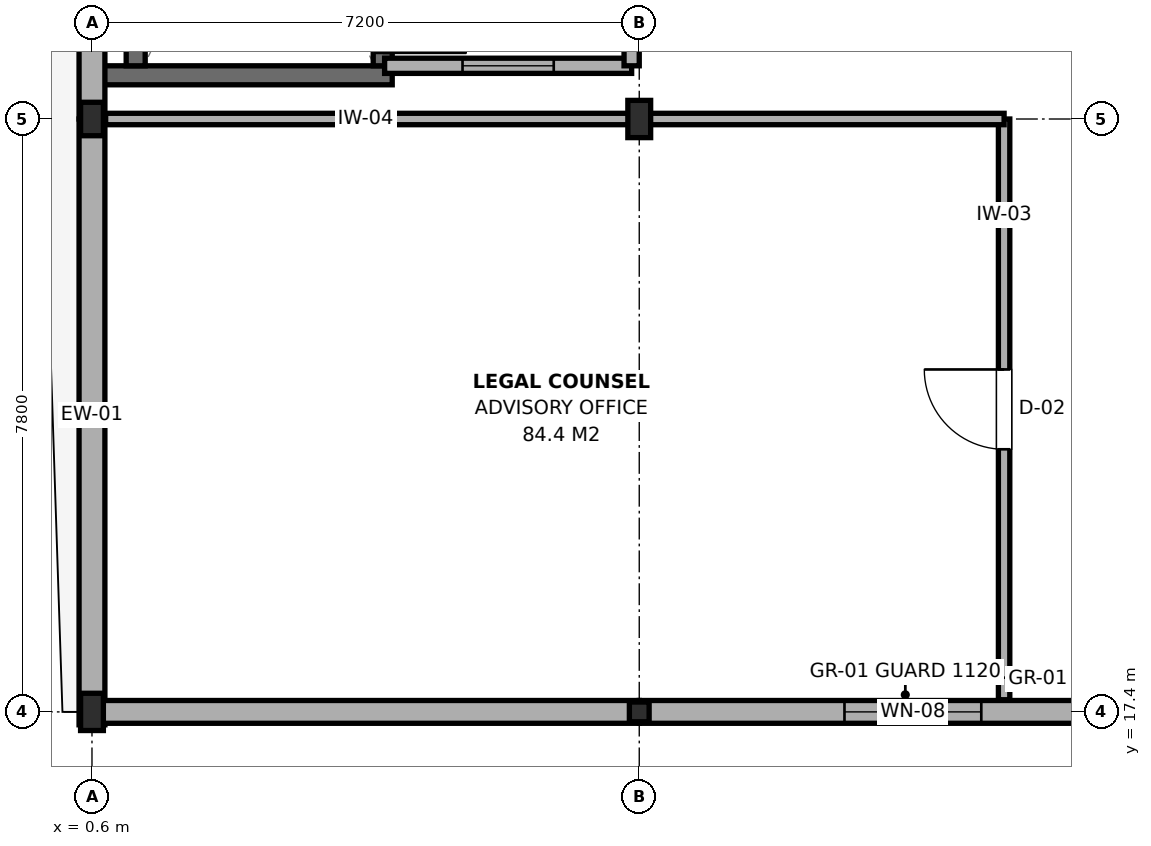
"""IFC4 building model, lengths in metres.
Left out: names, types, materials, properties, quantities, classifications, styles, units other than length and angle.
Written with IfcOpenShell. Run it as: python <this file> out.ifc"""

import sys

from ifc_helpers import new_model, si_unit, direction, frame, frame_2d, origin, origin_2d, place, context, subcontext, project, spatial, rectangle, i_section, extrude, element, fill, save


model = new_model("IFC4")
c1 = context("Model", 3, precision=1e-05, world=origin(), true_north=direction((0.0, 1.0)))
c2 = subcontext(c1, "Body", "Model", "MODEL_VIEW")
j1 = project(units=[si_unit("LENGTHUNIT", "METRE"), si_unit("PLANEANGLEUNIT", "RADIAN")], contexts=[c1])
p1 = place(None, origin())
s1 = spatial("IfcSite", under=j1, at=p1, CompositionType="ELEMENT")
p2 = place(p1, origin())
s2 = spatial("IfcBuilding", under=s1, at=p2, CompositionType="ELEMENT")
p3 = place(p2, frame((0.0, 0.0, 28.8)))
s3 = spatial("IfcBuildingStorey", under=s2, at=p3, CompositionType="ELEMENT", Elevation=28.8)
p4 = place(p3, frame((0.6, 17.4, 0.0), z_axis=(0.0, 0.0, 1.0), x_axis=(1.0, 0.0, 0.0)))
e1 = element("IfcColumn", 1, at=p4, inside=s3, PredefinedType="COLUMN", context=c2, shape_type="SweptSolid", body=[
    extrude(i_section(OverallWidth=0.3, OverallDepth=0.49, WebThickness=0.012, FlangeThickness=0.023, FilletRadius=0.027, at=origin_2d()), origin(), (0.0, 0.0, 1.0), 3.9),
])
p5 = place(p3, frame((0.6, 25.2, 0.0), z_axis=(0.0, 0.0, 1.0), x_axis=(1.0, 0.0, 0.0)))
e2 = element("IfcColumn", 2, at=p5, inside=s3, PredefinedType="COLUMN", context=c2, shape_type="SweptSolid", body=[
    extrude(i_section(OverallWidth=0.3, OverallDepth=0.44, WebThickness=0.011, FlangeThickness=0.021, FilletRadius=0.027, at=origin_2d()), origin(), (0.0, 0.0, 1.0), 3.9),
])
p6 = place(p3, frame((7.8, 17.4, 0.0), z_axis=(0.0, 0.0, 1.0), x_axis=(1.0, 0.0, 0.0)))
e3 = element("IfcColumn", 3, at=p6, inside=s3, PredefinedType="COLUMN", context=c2, shape_type="SweptSolid", body=[
    extrude(i_section(OverallWidth=0.26, OverallDepth=0.26, WebThickness=0.01, FlangeThickness=0.018, FilletRadius=0.024, at=origin_2d()), origin(), (0.0, 0.0, 1.0), 3.9),
])
p7 = place(p3, frame((7.8, 25.2, 0.0), z_axis=(0.0, 0.0, 1.0), x_axis=(1.0, 0.0, 0.0)))
e4 = element("IfcColumn", 4, at=p7, inside=s3, PredefinedType="COLUMN", context=c2, shape_type="SweptSolid", body=[
    extrude(i_section(OverallWidth=0.3, OverallDepth=0.49, WebThickness=0.012, FlangeThickness=0.023, FilletRadius=0.027, at=origin_2d()), origin(), (0.0, 0.0, 1.0), 3.9),
])
p8 = place(p3, frame((0.75, 25.775, 0.0), z_axis=(0.0, 0.0, 1.0), x_axis=(1.0, 0.0, 0.0)))
e5 = element("IfcWall", 5, at=p8, inside=s3, PredefinedType="SHEAR", context=c2, shape_type="SweptSolid", body=[
    extrude(rectangle(XDim=3.8, YDim=0.25, at=frame_2d((1.9, 0.0))), origin(), (0.0, 0.0, 1.0), 3.72),
])
p9 = place(p3, frame((1.175, 25.9, 0.0), z_axis=(0.0, 0.0, 1.0), x_axis=(0.0, 1.0, 0.0)))
e6 = element("IfcWall", 6, at=p9, inside=s3, PredefinedType="SHEAR", context=c2, shape_type="SweptSolid", body=[
    extrude(rectangle(XDim=6.4, YDim=0.25, at=frame_2d((3.2, 0.0))), origin(), (0.0, 0.0, 1.0), 3.72),
])
p10 = place(p3, frame((4.425, 25.9, 0.0), z_axis=(0.0, 0.0, 1.0), x_axis=(0.0, 1.0, 0.0)))
e7 = element("IfcWall", 7, at=p10, inside=s3, PredefinedType="SHEAR", context=c2, shape_type="SweptSolid", body=[
    extrude(rectangle(XDim=6.4, YDim=0.25, at=frame_2d((3.2, 0.0))), origin(), (0.0, 0.0, 1.0), 3.72),
])
p11 = place(p10, frame((0.17, 0.0, 0.0)))
e8 = element("IfcOpeningElement", 8, at=p11, cuts=e7, PredefinedType="OPENING", context=c2, shape_type="SweptSolid", body=[
    extrude(rectangle(XDim=1.1, YDim=2.15, at=frame_2d((0.55, 1.075))), frame((0.0, 0.14, 0.0), z_axis=(0.0, -1.0, 0.0), x_axis=(1.0, 0.0, 0.0)), (0.0, 0.0, 1.0), 0.28),
])
p12 = place(p3, frame((0.6, 17.23, 0.0), z_axis=(0.0, 0.0, 1.0), x_axis=(0.0, 1.0, 0.0)))
e9 = element("IfcWall", 9, at=p12, inside=s3, PredefinedType="SOLIDWALL", context=c2, shape_type="SweptSolid", body=[
    extrude(rectangle(XDim=7.97, YDim=0.34, at=frame_2d((3.985, 0.0))), origin(), (0.0, 0.0, 1.0), 3.265),
])
p13 = place(p3, frame((0.6, 25.2, 0.0), z_axis=(0.0, 0.0, 1.0), x_axis=(0.0, 1.0, 0.0)))
e10 = element("IfcWall", 10, at=p13, inside=s3, PredefinedType="SOLIDWALL", context=c2, shape_type="SweptSolid", body=[
    extrude(rectangle(XDim=5.6, YDim=0.34, at=frame_2d((2.8, 0.0))), origin(), (0.0, 0.0, 1.0), 3.265),
])
p14 = place(p3, frame((0.45, 17.4, 0.0), z_axis=(0.0, 0.0, 1.0), x_axis=(1.0, 0.0, 0.0)))
e11 = element("IfcWall", 11, at=p14, inside=s3, PredefinedType="SOLIDWALL", context=c2, shape_type="SweptSolid", body=[
    extrude(rectangle(XDim=7.35, YDim=0.3, at=frame_2d((3.675, 0.0))), origin(), (0.0, 0.0, 1.0), 3.365),
])
p15 = place(p3, frame((7.8, 17.4, 0.0), z_axis=(0.0, 0.0, 1.0), x_axis=(1.0, 0.0, 0.0)))
e12 = element("IfcWall", 12, at=p15, inside=s3, PredefinedType="SOLIDWALL", context=c2, shape_type="SweptSolid", body=[
    extrude(rectangle(XDim=7.2, YDim=0.3, at=frame_2d((3.6, 0.0))), origin(), (0.0, 0.0, 1.0), 3.115),
])
p16 = place(p15, frame((2.7, 0.0, 0.65)))
e13 = element("IfcOpeningElement", 13, at=p16, cuts=e12, PredefinedType="OPENING", context=c2, shape_type="SweptSolid", body=[
    extrude(rectangle(XDim=1.8, YDim=1.2, at=frame_2d((0.9, 0.6))), frame((0.0, 0.165, 0.0), z_axis=(0.0, -1.0, 0.0), x_axis=(1.0, 0.0, 0.0)), (0.0, 0.0, 1.0), 0.33),
])
p17 = place(p3, frame((4.45, 25.9, 0.0), z_axis=(0.0, 0.0, 1.0), x_axis=(1.0, 0.0, 0.0)))
e14 = element("IfcWall", 14, at=p17, inside=s3, PredefinedType="PARTITIONING", context=c2, shape_type="SweptSolid", body=[
    extrude(rectangle(XDim=3.25, YDim=0.2, at=frame_2d((1.625, 0.0))), origin(), (0.0, 0.0, 1.0), 3.385),
])
p18 = place(p17, frame((1.025, 0.0, 0.95)))
e15 = element("IfcOpeningElement", 15, at=p18, cuts=e14, PredefinedType="OPENING", context=c2, shape_type="SweptSolid", body=[
    extrude(rectangle(XDim=1.2, YDim=1.5, at=frame_2d((0.6, 0.75))), frame((0.0, 0.115, 0.0), z_axis=(0.0, -1.0, 0.0), x_axis=(1.0, 0.0, 0.0)), (0.0, 0.0, 1.0), 0.23),
])
p19 = place(p3, frame((7.7, 25.9, 0.0), z_axis=(0.0, 0.0, 1.0), x_axis=(0.0, 1.0, 0.0)))
e16 = element("IfcWall", 16, at=p19, inside=s3, PredefinedType="PARTITIONING", context=c2, shape_type="SweptSolid", body=[
    extrude(rectangle(XDim=3.6, YDim=0.2, at=frame_2d((1.8, 0.0))), origin(), (0.0, 0.0, 1.0), 3.385),
])
p20 = place(p19, frame((1.25, 0.0, 0.0)))
e17 = element("IfcOpeningElement", 17, at=p20, cuts=e16, PredefinedType="OPENING", context=c2, shape_type="SweptSolid", body=[
    extrude(rectangle(XDim=1.1, YDim=2.15, at=frame_2d((0.55, 1.075))), frame((0.0, 0.115, 0.0), z_axis=(0.0, -1.0, 0.0), x_axis=(1.0, 0.0, 0.0)), (0.0, 0.0, 1.0), 0.23),
])
p21 = place(p3, frame((12.6, 17.56, 0.0), z_axis=(0.0, 0.0, 1.0), x_axis=(0.0, 1.0, 0.0)))
e18 = element("IfcWall", 18, at=p21, inside=s3, PredefinedType="PARTITIONING", context=c2, shape_type="SweptSolid", body=[
    extrude(rectangle(XDim=7.64, YDim=0.15, at=frame_2d((3.82, 0.0))), origin(), (0.0, 0.0, 1.0), 3.215),
])
p22 = place(p21, frame((3.295, 0.0, 0.0)))
e19 = element("IfcOpeningElement", 19, at=p22, cuts=e18, PredefinedType="OPENING", context=c2, shape_type="SweptSolid", body=[
    extrude(rectangle(XDim=1.05, YDim=2.15, at=frame_2d((0.525, 1.075))), frame((0.0, 0.09, 0.0), z_axis=(0.0, -1.0, 0.0), x_axis=(1.0, 0.0, 0.0)), (0.0, 0.0, 1.0), 0.18),
])
p23 = place(p3, frame((0.78, 25.2, 0.0), z_axis=(0.0, 0.0, 1.0), x_axis=(1.0, 0.0, 0.0)))
e20 = element("IfcWall", 20, at=p23, inside=s3, PredefinedType="PARTITIONING", context=c2, shape_type="SweptSolid", body=[
    extrude(rectangle(XDim=11.82, YDim=0.15, at=frame_2d((5.91, 0.0))), origin(), (0.0, 0.0, 1.0), 3.165),
])
p24 = place(p16, origin())
e21 = element("IfcWindow", 21, at=p24, inside=s3, PartitioningType="SINGLE_PANEL", PredefinedType="WINDOW", context=c2, shape_type="SweptSolid", body=[
    extrude(rectangle(XDim=1.8, YDim=1.2, at=frame_2d((0.9, 0.6))), frame((0.0, 0.03, 0.0), z_axis=(0.0, -1.0, 0.0), x_axis=(1.0, 0.0, 0.0)), (0.0, 0.0, 1.0), 0.06),
])
fill(e13, e21)
p25 = place(p11, frame((1.1, 0.0, 0.0), z_axis=(0.0, 0.0, 1.0), x_axis=(-1.0, 0.0, 0.0)))
e22 = element("IfcDoor", 22, at=p25, inside=s3, OperationType="SINGLE_SWING_RIGHT", PredefinedType="DOOR", context=c2, shape_type="SweptSolid", body=[
    extrude(rectangle(XDim=1.1, YDim=2.15, at=frame_2d((0.55, 1.075))), frame((0.0, 0.025, 0.0), z_axis=(0.0, -1.0, 0.0), x_axis=(1.0, 0.0, 0.0)), (0.0, 0.0, 1.0), 0.05),
])
fill(e8, e22)
p26 = place(p18, origin())
e23 = element("IfcWindow", 23, at=p26, inside=s3, PartitioningType="SINGLE_PANEL", PredefinedType="WINDOW", context=c2, shape_type="SweptSolid", body=[
    extrude(rectangle(XDim=1.2, YDim=1.5, at=frame_2d((0.6, 0.75))), frame((0.0, 0.03, 0.0), z_axis=(0.0, -1.0, 0.0), x_axis=(1.0, 0.0, 0.0)), (0.0, 0.0, 1.0), 0.06),
])
fill(e15, e23)
p27 = place(p22, origin())
e24 = element("IfcDoor", 24, at=p27, inside=s3, OperationType="SINGLE_SWING_RIGHT", PredefinedType="DOOR", context=c2, shape_type="SweptSolid", body=[
    extrude(rectangle(XDim=1.05, YDim=2.15, at=frame_2d((0.525, 1.075))), frame((0.0, 0.025, 0.0), z_axis=(0.0, -1.0, 0.0), x_axis=(1.0, 0.0, 0.0)), (0.0, 0.0, 1.0), 0.05),
])
fill(e19, e24)
save(model, sys.argv[1])
